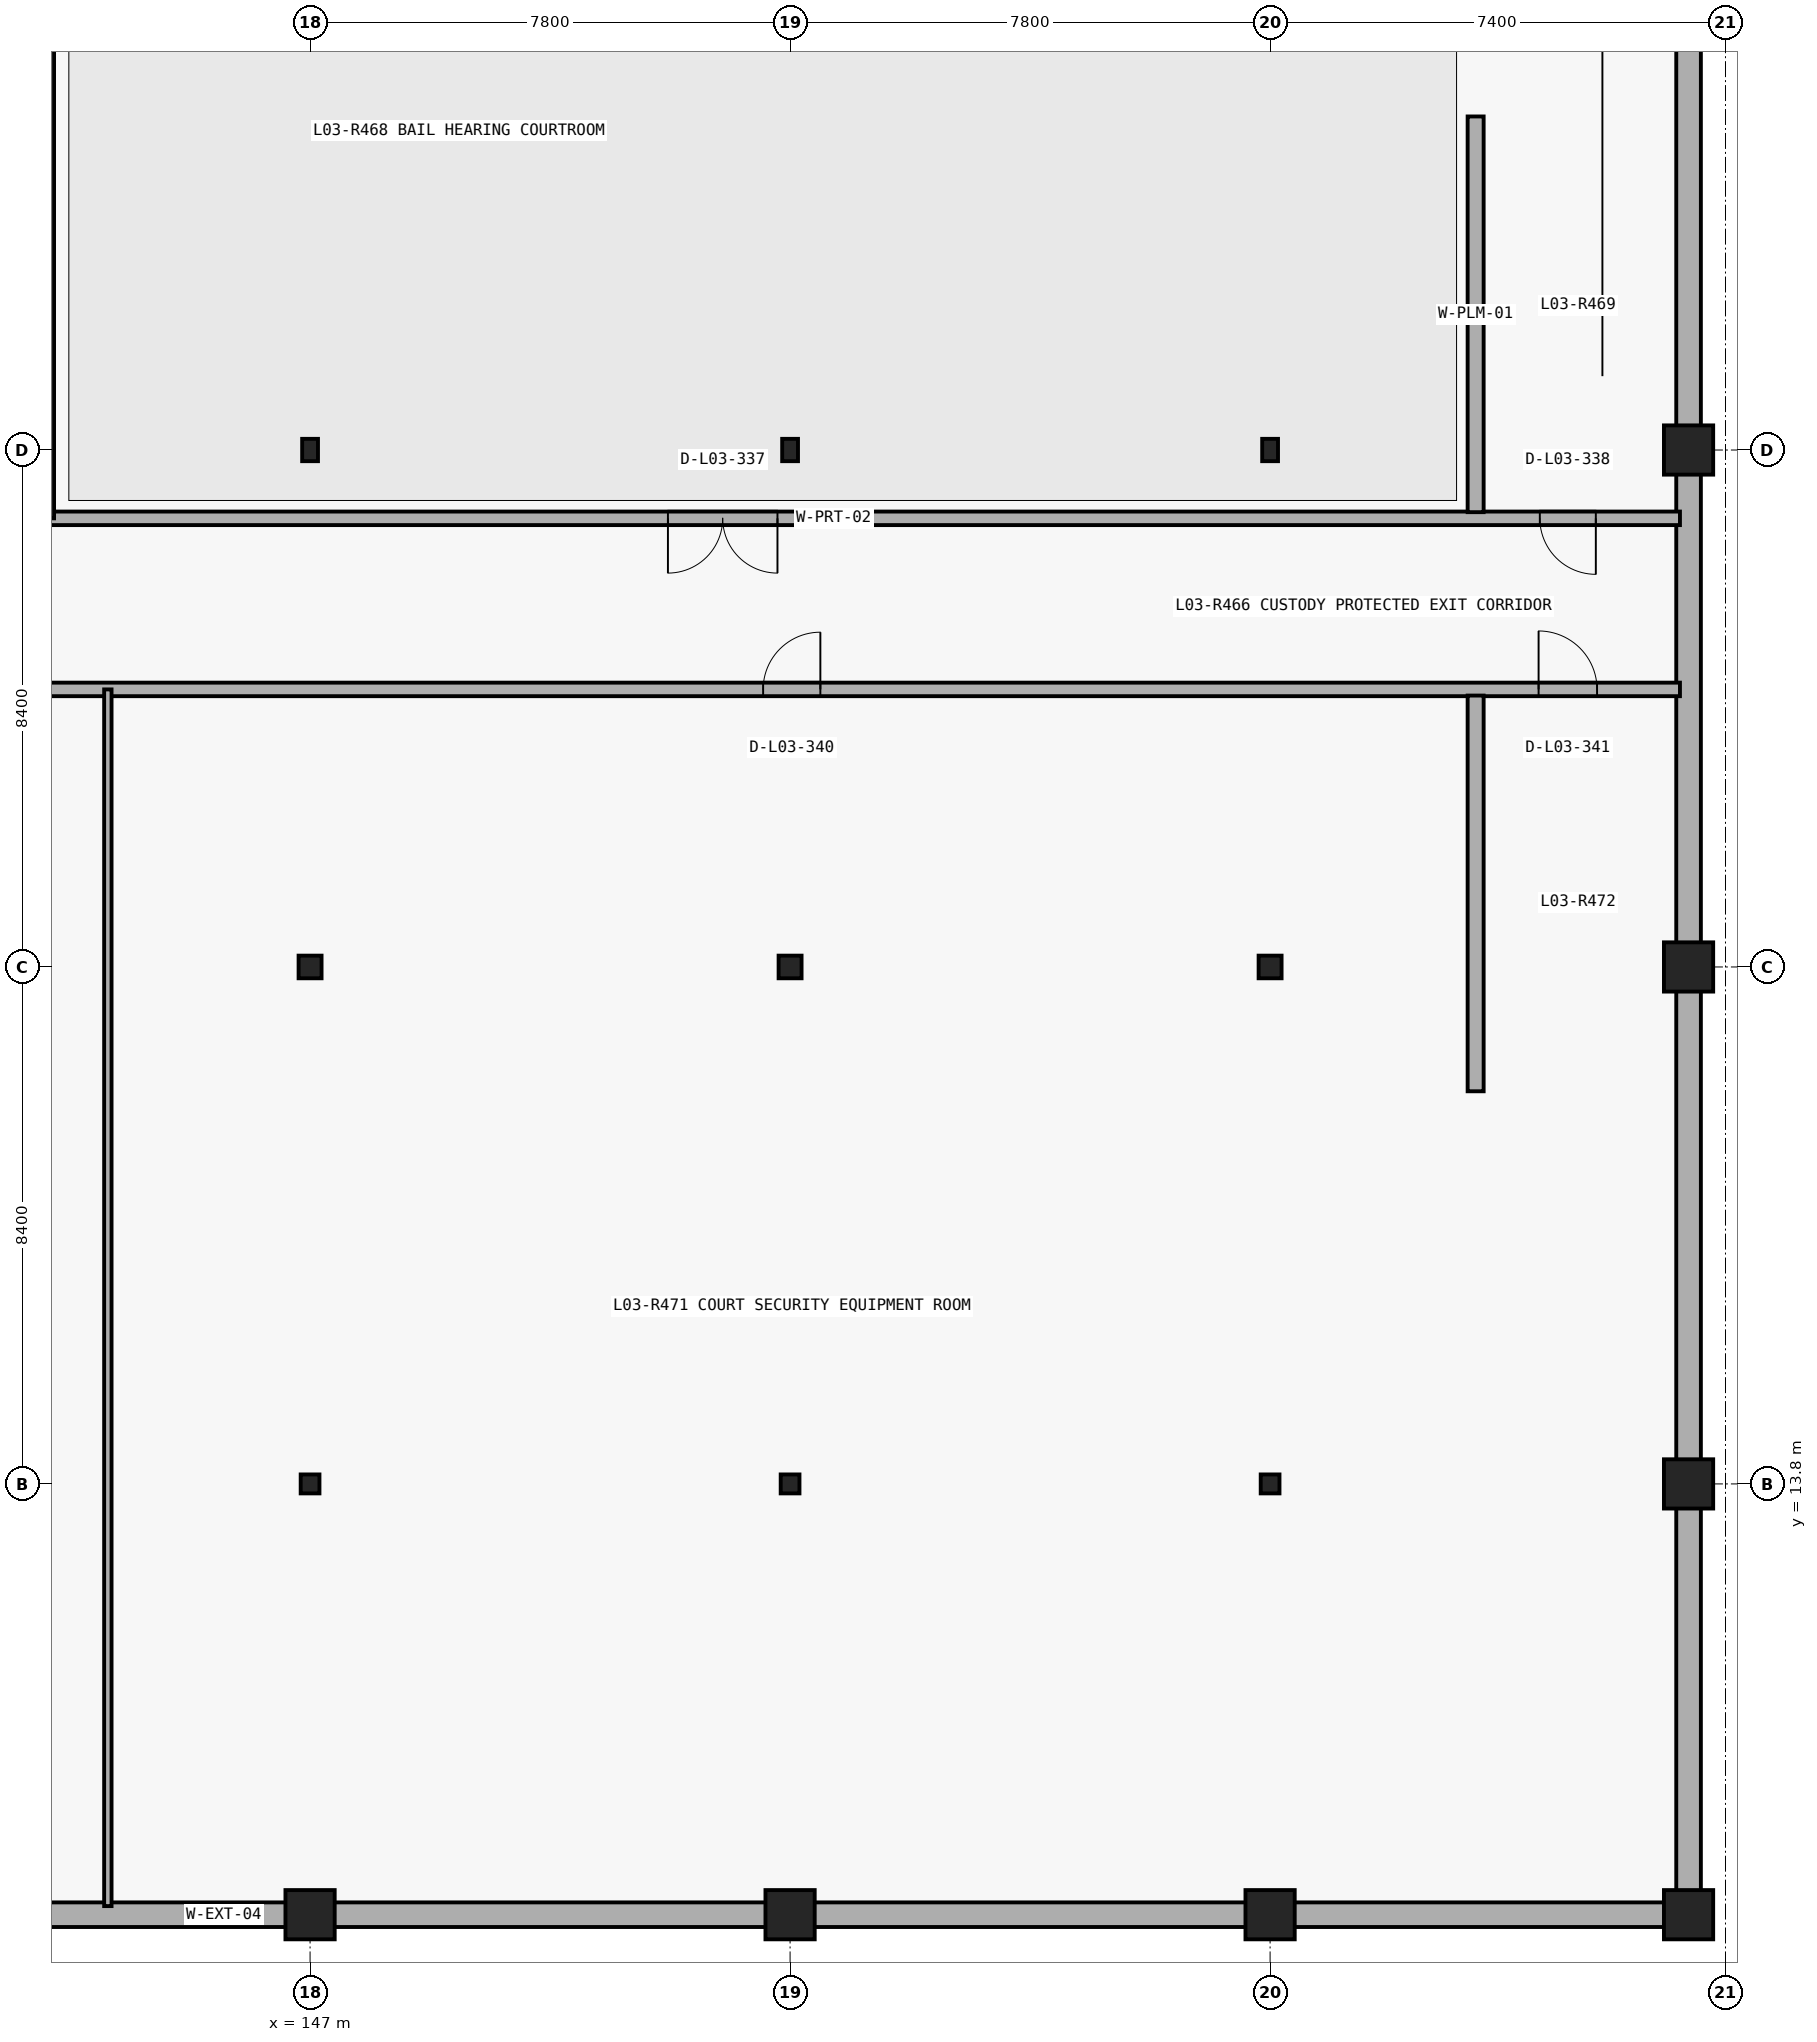
"""IFC4 building model, lengths in metres.
Left out: names, types, materials, properties, quantities, classifications, styles, units other than length and angle.
Written with IfcOpenShell. Run it as: python <this file> out.ifc"""

import sys

from ifc_helpers import new_model, si_unit, direction, frame, frame_2d, origin_with_axes, origin_2d_with_axis, place, context, subcontext, project, spatial, rectangle, circle, i_section, extrude, element, fill, save


model = new_model("IFC4")
c1 = context("Model", 3, precision=1e-05, world=origin_with_axes(), true_north=direction((0.0, 1.0)))
c2 = subcontext(c1, "Body", "Model", "MODEL_VIEW")
j1 = project(units=[si_unit("LENGTHUNIT", "METRE"), si_unit("PLANEANGLEUNIT", "RADIAN")], contexts=[c1])
p1 = place(None, origin_with_axes())
s1 = spatial("IfcSite", under=j1, at=p1, CompositionType="ELEMENT")
p2 = place(p1, origin_with_axes())
s2 = spatial("IfcBuilding", under=s1, at=p2, CompositionType="ELEMENT")
p3 = place(p2, frame((0.0, 0.0, 15.6), z_axis=(0.0, 0.0, 1.0), x_axis=(1.0, 0.0, 0.0)))
s3 = spatial("IfcBuildingStorey", under=s2, at=p3, CompositionType="ELEMENT", Elevation=15.6)
p4 = place(None, frame((121.8, 6.8, 15.6), z_axis=(0.0, 0.0, 1.0), x_axis=(1.0, 0.0, 0.0)))
e1 = element("IfcWall", 1, at=p4, inside=s3, PredefinedType="SOLIDWALL", context=c2, shape_type="SweptSolid", body=[
    extrude(rectangle(XDim=47.6, YDim=0.4, at=frame_2d((23.8, 0.0), x_axis=(1.0, 0.0))), origin_with_axes(), (0.0, 0.0, 1.0), 4.074),
])
p5 = place(None, frame((169.4, 7.06, 15.6), z_axis=(0.0, 0.0, 1.0), x_axis=(0.0, 1.0, 0.0)))
e2 = element("IfcWall", 2, at=p5, inside=s3, PredefinedType="SOLIDWALL", context=c2, shape_type="SweptSolid", body=[
    extrude(rectangle(XDim=47.28, YDim=0.4, at=frame_2d((23.64, 0.0), x_axis=(1.0, 0.0))), origin_with_axes(), (0.0, 0.0, 1.0), 4.074),
])
p6 = place(None, frame((141.755, 29.49, 15.6), z_axis=(0.0, 0.0, 1.0), x_axis=(1.0, 0.0, 0.0)))
e3 = element("IfcWall", 3, at=p6, inside=s3, PredefinedType="PARTITIONING", context=c2, shape_type="SweptSolid", body=[
    extrude(rectangle(XDim=27.505, YDim=0.22, at=frame_2d((13.752, 0.0), x_axis=(1.0, 0.0))), origin_with_axes(), (0.0, 0.0, 1.0), 4.48),
])
p7 = place(None, frame((153.705, 29.49, 15.6), z_axis=(0.0, 0.0, 1.0), x_axis=(1.0, 0.0, 0.0)))
e4 = element("IfcOpeningElement", 4, at=p7, cuts=e3, PredefinedType="OPENING", context=c2, shape_type="SweptSolid", body=[
    extrude(rectangle(XDim=1.78, YDim=2.48, at=frame_2d((0.0, 1.24), x_axis=(1.0, 0.0))), frame((0.0, 0.12, 0.0), z_axis=(0.0, -1.0, 0.0), x_axis=(1.0, 0.0, 0.0)), (0.0, 0.0, 1.0), 0.24),
])
p8 = place(None, frame((167.438, 29.49, 15.6), z_axis=(0.0, 0.0, 1.0), x_axis=(1.0, 0.0, 0.0)))
e5 = element("IfcOpeningElement", 5, at=p8, cuts=e3, PredefinedType="OPENING", context=c2, shape_type="SweptSolid", body=[
    extrude(rectangle(XDim=0.91, YDim=2.12, at=frame_2d((0.0, 1.06), x_axis=(1.0, 0.0))), frame((0.0, 0.12, 0.0), z_axis=(0.0, -1.0, 0.0), x_axis=(1.0, 0.0, 0.0)), (0.0, 0.0, 1.0), 0.24),
])
p9 = place(None, frame((121.94, 26.71, 15.6), z_axis=(0.0, 0.0, 1.0), x_axis=(1.0, 0.0, 0.0)))
e6 = element("IfcWall", 6, at=p9, inside=s3, PredefinedType="PARTITIONING", context=c2, shape_type="SweptSolid", body=[
    extrude(rectangle(XDim=47.32, YDim=0.22, at=frame_2d((23.66, 0.0), x_axis=(1.0, 0.0))), origin_with_axes(), (0.0, 0.0, 1.0), 4.48),
])
p10 = place(None, frame((132.989, 26.71, 15.6), z_axis=(0.0, 0.0, 1.0), x_axis=(1.0, 0.0, 0.0)))
e7 = element("IfcOpeningElement", 7, at=p10, cuts=e6, PredefinedType="OPENING", context=c2, shape_type="SweptSolid", body=[
    extrude(rectangle(XDim=1.08, YDim=2.18, at=frame_2d((0.0, 1.09), x_axis=(1.0, 0.0))), frame((0.0, 0.12, 0.0), z_axis=(0.0, -1.0, 0.0), x_axis=(1.0, 0.0, 0.0)), (0.0, 0.0, 1.0), 0.24),
])
p11 = place(None, frame((154.827, 26.71, 15.6), z_axis=(0.0, 0.0, 1.0), x_axis=(1.0, 0.0, 0.0)))
e8 = element("IfcOpeningElement", 8, at=p11, cuts=e6, PredefinedType="OPENING", context=c2, shape_type="SweptSolid", body=[
    extrude(rectangle(XDim=0.93, YDim=2.1, at=frame_2d((0.0, 1.05), x_axis=(1.0, 0.0))), frame((0.0, 0.12, 0.0), z_axis=(0.0, -1.0, 0.0), x_axis=(1.0, 0.0, 0.0)), (0.0, 0.0, 1.0), 0.24),
])
p12 = place(None, frame((167.438, 26.71, 15.6), z_axis=(0.0, 0.0, 1.0), x_axis=(1.0, 0.0, 0.0)))
e9 = element("IfcOpeningElement", 9, at=p12, cuts=e6, PredefinedType="OPENING", context=c2, shape_type="SweptSolid", body=[
    extrude(rectangle(XDim=0.95, YDim=2.1, at=frame_2d((0.0, 1.05), x_axis=(1.0, 0.0))), frame((0.0, 0.12, 0.0), z_axis=(0.0, -1.0, 0.0), x_axis=(1.0, 0.0, 0.0)), (0.0, 0.0, 1.0), 0.24),
])
p13 = place(None, frame((165.94, 29.59, 15.6), z_axis=(0.0, 0.0, 1.0), x_axis=(0.0, 1.0, 0.0)))
e10 = element("IfcWall", 10, at=p13, inside=s3, PredefinedType="PLUMBINGWALL", context=c2, shape_type="SweptSolid", body=[
    extrude(rectangle(XDim=6.43, YDim=0.26, at=frame_2d((3.215, 0.0), x_axis=(1.0, 0.0))), origin_with_axes(), (0.0, 0.0, 1.0), 4.48),
])
p14 = place(None, frame((165.94, 20.18, 15.6), z_axis=(0.0, 0.0, 1.0), x_axis=(0.0, 1.0, 0.0)))
e11 = element("IfcWall", 11, at=p14, inside=s3, PredefinedType="PLUMBINGWALL", context=c2, shape_type="SweptSolid", body=[
    extrude(rectangle(XDim=6.43, YDim=0.26, at=frame_2d((3.215, 0.0), x_axis=(1.0, 0.0))), origin_with_axes(), (0.0, 0.0, 1.0), 4.48),
])
p15 = place(None, frame((142.77, 29.49, 15.6), z_axis=(0.0, 0.0, 1.0), x_axis=(0.0, 1.0, 0.0)))
e12 = element("IfcWall", 12, at=p15, inside=s3, PredefinedType="PARTITIONING", context=c2, shape_type="SweptSolid", body=[
    extrude(rectangle(XDim=24.97, YDim=0.14, at=frame_2d((12.485, 0.0), x_axis=(1.0, 0.0))), origin_with_axes(), (0.0, 0.0, 1.0), 4.48),
])
p16 = place(None, frame((143.714, 6.94, 15.6), z_axis=(0.0, 0.0, 1.0), x_axis=(0.0, 1.0, 0.0)))
e13 = element("IfcWall", 13, at=p16, inside=s3, PredefinedType="PARTITIONING", context=c2, shape_type="SweptSolid", body=[
    extrude(rectangle(XDim=19.77, YDim=0.12, at=frame_2d((9.885, 0.0), x_axis=(1.0, 0.0))), origin_with_axes(), (0.0, 0.0, 1.0), 4.48),
])
p17 = place(None, frame((147.0, 6.8, 15.6), z_axis=(0.0, 0.0, 1.0), x_axis=(1.0, 0.0, 0.0)))
e14 = element("IfcColumn", 14, at=p17, inside=s3, PredefinedType="COLUMN", context=c2, shape_type="SweptSolid", body=[
    extrude(circle(Radius=0.4, at=origin_2d_with_axis()), origin_with_axes(), (0.0, 0.0, 1.0), 4.8),
])
p18 = place(None, frame((147.0, 13.8, 15.6), z_axis=(0.0, 0.0, 1.0), x_axis=(1.0, 0.0, 0.0)))
e15 = element("IfcColumn", 15, at=p18, inside=s3, PredefinedType="COLUMN", context=c2, shape_type="SweptSolid", body=[
    extrude(i_section(OverallWidth=0.305, OverallDepth=0.308, WebThickness=0.01, FlangeThickness=0.015, at=origin_2d_with_axis()), origin_with_axes(), (0.0, 0.0, 1.0), 4.8),
])
p19 = place(None, frame((147.0, 22.2, 15.6), z_axis=(0.0, 0.0, 1.0), x_axis=(1.0, 0.0, 0.0)))
e16 = element("IfcColumn", 16, at=p19, inside=s3, PredefinedType="COLUMN", context=c2, shape_type="SweptSolid", body=[
    extrude(i_section(OverallWidth=0.373, OverallDepth=0.368, WebThickness=0.015, FlangeThickness=0.024, at=origin_2d_with_axis()), origin_with_axes(), (0.0, 0.0, 1.0), 4.8),
])
p20 = place(None, frame((147.0, 30.6, 15.6), z_axis=(0.0, 0.0, 1.0), x_axis=(1.0, 0.0, 0.0)))
e17 = element("IfcColumn", 17, at=p20, inside=s3, PredefinedType="COLUMN", context=c2, shape_type="SweptSolid", body=[
    extrude(i_section(OverallWidth=0.257, OverallDepth=0.363, WebThickness=0.013, FlangeThickness=0.022, at=origin_2d_with_axis()), origin_with_axes(), (0.0, 0.0, 1.0), 4.8),
])
p21 = place(None, frame((154.8, 6.8, 15.6), z_axis=(0.0, 0.0, 1.0), x_axis=(1.0, 0.0, 0.0)))
e18 = element("IfcColumn", 18, at=p21, inside=s3, PredefinedType="COLUMN", context=c2, shape_type="SweptSolid", body=[
    extrude(circle(Radius=0.4, at=origin_2d_with_axis()), origin_with_axes(), (0.0, 0.0, 1.0), 4.8),
])
p22 = place(None, frame((154.8, 13.8, 15.6), z_axis=(0.0, 0.0, 1.0), x_axis=(1.0, 0.0, 0.0)))
e19 = element("IfcColumn", 19, at=p22, inside=s3, PredefinedType="COLUMN", context=c2, shape_type="SweptSolid", body=[
    extrude(i_section(OverallWidth=0.305, OverallDepth=0.308, WebThickness=0.01, FlangeThickness=0.015, at=origin_2d_with_axis()), origin_with_axes(), (0.0, 0.0, 1.0), 4.8),
])
p23 = place(None, frame((154.8, 22.2, 15.6), z_axis=(0.0, 0.0, 1.0), x_axis=(1.0, 0.0, 0.0)))
e20 = element("IfcColumn", 20, at=p23, inside=s3, PredefinedType="COLUMN", context=c2, shape_type="SweptSolid", body=[
    extrude(i_section(OverallWidth=0.373, OverallDepth=0.368, WebThickness=0.015, FlangeThickness=0.024, at=origin_2d_with_axis()), origin_with_axes(), (0.0, 0.0, 1.0), 4.8),
])
p24 = place(None, frame((154.8, 30.6, 15.6), z_axis=(0.0, 0.0, 1.0), x_axis=(1.0, 0.0, 0.0)))
e21 = element("IfcColumn", 21, at=p24, inside=s3, PredefinedType="COLUMN", context=c2, shape_type="SweptSolid", body=[
    extrude(i_section(OverallWidth=0.257, OverallDepth=0.363, WebThickness=0.013, FlangeThickness=0.022, at=origin_2d_with_axis()), origin_with_axes(), (0.0, 0.0, 1.0), 4.8),
])
p25 = place(None, frame((162.6, 6.8, 15.6), z_axis=(0.0, 0.0, 1.0), x_axis=(1.0, 0.0, 0.0)))
e22 = element("IfcColumn", 22, at=p25, inside=s3, PredefinedType="COLUMN", context=c2, shape_type="SweptSolid", body=[
    extrude(circle(Radius=0.4, at=origin_2d_with_axis()), origin_with_axes(), (0.0, 0.0, 1.0), 4.8),
])
p26 = place(None, frame((162.6, 13.8, 15.6), z_axis=(0.0, 0.0, 1.0), x_axis=(1.0, 0.0, 0.0)))
e23 = element("IfcColumn", 23, at=p26, inside=s3, PredefinedType="COLUMN", context=c2, shape_type="SweptSolid", body=[
    extrude(i_section(OverallWidth=0.305, OverallDepth=0.308, WebThickness=0.01, FlangeThickness=0.015, at=origin_2d_with_axis()), origin_with_axes(), (0.0, 0.0, 1.0), 4.8),
])
p27 = place(None, frame((162.6, 22.2, 15.6), z_axis=(0.0, 0.0, 1.0), x_axis=(1.0, 0.0, 0.0)))
e24 = element("IfcColumn", 24, at=p27, inside=s3, PredefinedType="COLUMN", context=c2, shape_type="SweptSolid", body=[
    extrude(i_section(OverallWidth=0.373, OverallDepth=0.368, WebThickness=0.015, FlangeThickness=0.024, at=origin_2d_with_axis()), origin_with_axes(), (0.0, 0.0, 1.0), 4.8),
])
p28 = place(None, frame((162.6, 30.6, 15.6), z_axis=(0.0, 0.0, 1.0), x_axis=(1.0, 0.0, 0.0)))
e25 = element("IfcColumn", 25, at=p28, inside=s3, PredefinedType="COLUMN", context=c2, shape_type="SweptSolid", body=[
    extrude(i_section(OverallWidth=0.257, OverallDepth=0.363, WebThickness=0.013, FlangeThickness=0.022, at=origin_2d_with_axis()), origin_with_axes(), (0.0, 0.0, 1.0), 4.8),
])
for number, where, z_axis, x_axis in (
    (26, (169.4, 6.8, 15.6), (0.0, 0.0, 1.0), (1.0, 0.0, 0.0)),
    (27, (169.4, 13.8, 15.6), (0.0, 0.0, 1.0), (1.0, 0.0, 0.0)),
    (28, (169.4, 22.2, 15.6), (0.0, 0.0, 1.0), (1.0, 0.0, 0.0)),
    (29, (169.4, 30.6, 15.6), (0.0, 0.0, 1.0), (1.0, 0.0, 0.0)),
):
    element("IfcColumn", number, at=place(None, frame(where, z_axis=z_axis, x_axis=x_axis)), inside=s3, PredefinedType="COLUMN", context=c2, shape_type="SweptSolid", body=[
        extrude(circle(Radius=0.4, at=origin_2d_with_axis()), origin_with_axes(), (0.0, 0.0, 1.0), 4.8),
    ])
p29 = place(None, frame((153.705, 29.49, 15.6), z_axis=(0.0, 0.0, 1.0), x_axis=(-1.0, 0.0, 0.0)))
e30 = element("IfcDoor", 30, at=p29, inside=s3, OperationType="DOUBLE_DOOR_SINGLE_SWING", PredefinedType="DOOR", context=c2, shape_type="SweptSolid", body=[
    extrude(rectangle(XDim=1.78, YDim=2.48, at=frame_2d((0.0, 1.24), x_axis=(1.0, 0.0))), frame((0.0, 0.04, 0.0), z_axis=(0.0, -1.0, 0.0), x_axis=(1.0, 0.0, 0.0)), (0.0, 0.0, 1.0), 0.08),
])
fill(e4, e30)
p30 = place(None, frame((167.438, 29.49, 15.6), z_axis=(0.0, 0.0, 1.0), x_axis=(-1.0, 0.0, 0.0)))
e31 = element("IfcDoor", 31, at=p30, inside=s3, OperationType="SINGLE_SWING_RIGHT", PredefinedType="DOOR", context=c2, shape_type="SweptSolid", body=[
    extrude(rectangle(XDim=0.91, YDim=2.12, at=frame_2d((0.0, 1.06), x_axis=(1.0, 0.0))), frame((0.0, 0.04, 0.0), z_axis=(0.0, -1.0, 0.0), x_axis=(1.0, 0.0, 0.0)), (0.0, 0.0, 1.0), 0.08),
])
fill(e5, e31)
p31 = place(None, frame((154.827, 26.71, 15.6), z_axis=(0.0, 0.0, 1.0), x_axis=(1.0, 0.0, 0.0)))
e32 = element("IfcDoor", 32, at=p31, inside=s3, OperationType="SINGLE_SWING_RIGHT", PredefinedType="DOOR", context=c2, shape_type="SweptSolid", body=[
    extrude(rectangle(XDim=0.93, YDim=2.1, at=frame_2d((0.0, 1.05), x_axis=(1.0, 0.0))), frame((0.0, 0.04, 0.0), z_axis=(0.0, -1.0, 0.0), x_axis=(1.0, 0.0, 0.0)), (0.0, 0.0, 1.0), 0.08),
])
fill(e8, e32)
p32 = place(None, frame((167.438, 26.71, 15.6), z_axis=(0.0, 0.0, 1.0), x_axis=(1.0, 0.0, 0.0)))
e33 = element("IfcDoor", 33, at=p32, inside=s3, OperationType="SINGLE_SWING_LEFT", PredefinedType="DOOR", context=c2, shape_type="SweptSolid", body=[
    extrude(rectangle(XDim=0.95, YDim=2.1, at=frame_2d((0.0, 1.05), x_axis=(1.0, 0.0))), frame((0.0, 0.04, 0.0), z_axis=(0.0, -1.0, 0.0), x_axis=(1.0, 0.0, 0.0)), (0.0, 0.0, 1.0), 0.08),
])
fill(e9, e33)
save(model, sys.argv[1])
